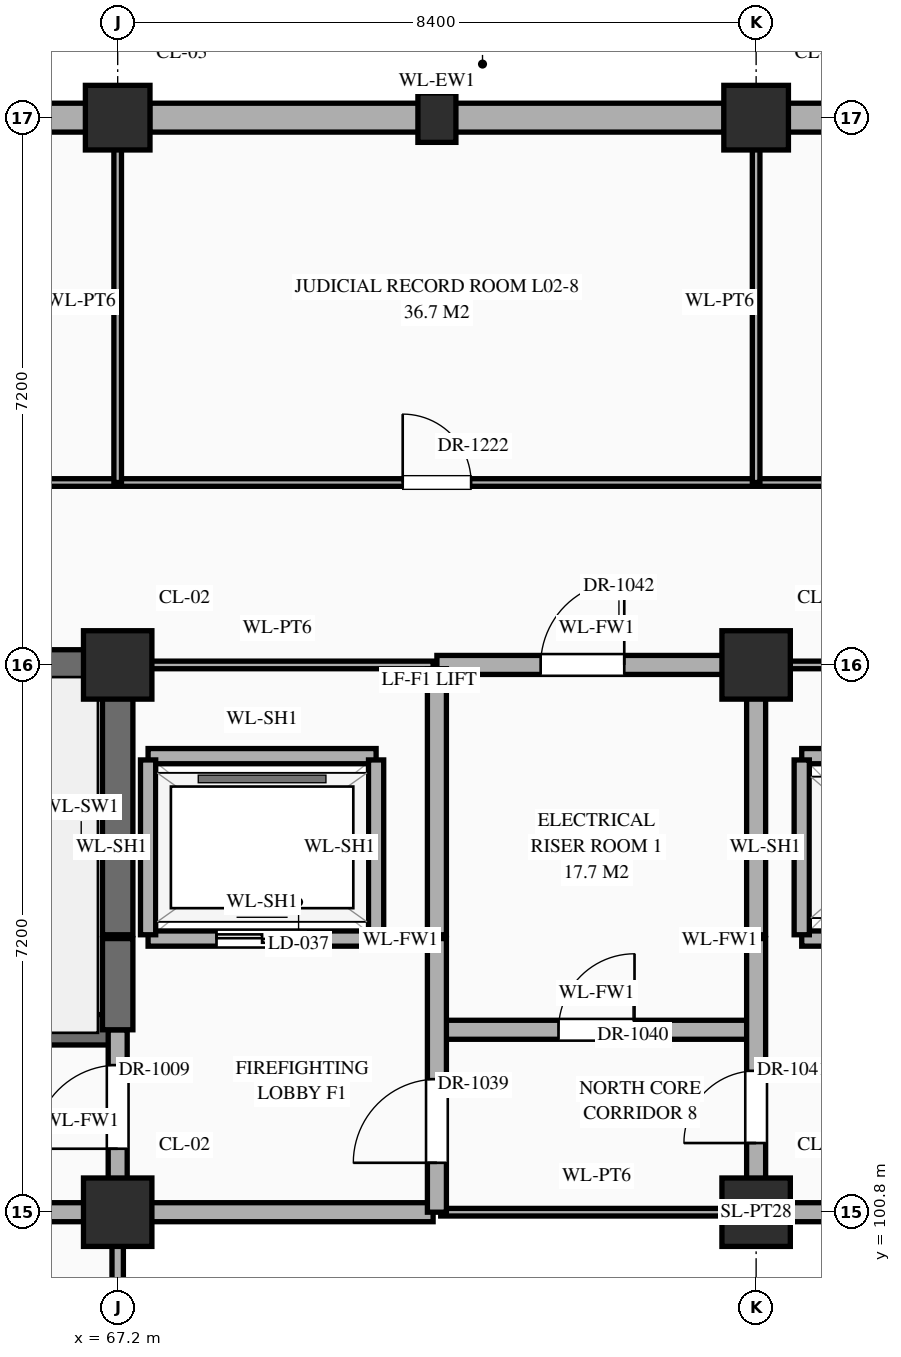
"""IFC4 building model, lengths in metres.
Left out: names, types, materials, properties, quantities, classifications, styles, units other than length and angle.
Written with IfcOpenShell. Run it as: python <this file> out.ifc"""

import sys

from ifc_helpers import new_model, si_unit, direction, frame, frame_2d, origin, origin_2d, place, context, subcontext, project, spatial, rectangle, extrude, element, fill, save


model = new_model("IFC4")
c1 = context("Model", 3, precision=1e-05, world=origin(), true_north=direction((0.0, 1.0)))
c2 = subcontext(c1, "Body", "Model", "MODEL_VIEW")
j1 = project(units=[si_unit("LENGTHUNIT", "METRE"), si_unit("PLANEANGLEUNIT", "RADIAN")], contexts=[c1])
p1 = place(None, origin())
s1 = spatial("IfcSite", under=j1, at=p1, CompositionType="ELEMENT")
p2 = place(p1, origin())
s2 = spatial("IfcBuilding", under=s1, at=p2, CompositionType="ELEMENT")
p3 = place(p2, frame((0.0, 0.0, 5.4)))
s3 = spatial("IfcBuildingStorey", under=s2, at=p3, CompositionType="ELEMENT", Elevation=5.4)
for number, where, z_axis, x_axis in (
    (1, (67.2, 100.8, 0.0), (0.0, 0.0, 1.0), (1.0, 0.0, 0.0)),
    (2, (67.2, 108.0, 0.0), (0.0, 0.0, 1.0), (1.0, 0.0, 0.0)),
):
    element("IfcColumn", number, at=place(p3, frame(where, z_axis=z_axis, x_axis=x_axis)), inside=s3, PredefinedType="COLUMN", context=c2, shape_type="SweptSolid", body=[
        extrude(rectangle(XDim=0.9, YDim=0.9, at=origin_2d()), origin(), (0.0, 0.0, 1.0), 5.4),
    ])
p4 = place(p3, frame((67.2, 115.2, 0.0), z_axis=(0.0, 0.0, 1.0), x_axis=(1.0, 0.0, 0.0)))
e3 = element("IfcColumn", 3, at=p4, inside=s3, PredefinedType="COLUMN", context=c2, shape_type="SweptSolid", body=[
    extrude(rectangle(XDim=0.85, YDim=0.85, at=origin_2d()), origin(), (0.0, 0.0, 1.0), 5.4),
])
for number, where, z_axis, x_axis in (
    (4, (75.6, 100.8, 0.0), (0.0, 0.0, 1.0), (1.0, 0.0, 0.0)),
    (5, (75.6, 108.0, 0.0), (0.0, 0.0, 1.0), (1.0, 0.0, 0.0)),
):
    element("IfcColumn", number, at=place(p3, frame(where, z_axis=z_axis, x_axis=x_axis)), inside=s3, PredefinedType="COLUMN", context=c2, shape_type="SweptSolid", body=[
        extrude(rectangle(XDim=0.9, YDim=0.9, at=origin_2d()), origin(), (0.0, 0.0, 1.0), 5.4),
    ])
p5 = place(p3, frame((75.6, 115.2, 0.0), z_axis=(0.0, 0.0, 1.0), x_axis=(1.0, 0.0, 0.0)))
e6 = element("IfcColumn", 6, at=p5, inside=s3, PredefinedType="COLUMN", context=c2, shape_type="SweptSolid", body=[
    extrude(rectangle(XDim=0.85, YDim=0.85, at=origin_2d()), origin(), (0.0, 0.0, 1.0), 5.4),
])
p6 = place(p3, frame((71.4, 115.2, 0.0), z_axis=(0.0, 0.0, 1.0), x_axis=(1.0, 0.0, 0.0)))
e7 = element("IfcColumn", 7, at=p6, inside=s3, PredefinedType="PILASTER", context=c2, shape_type="SweptSolid", body=[
    extrude(rectangle(XDim=0.5, YDim=0.65, at=origin_2d()), origin(), (0.0, 0.0, 1.0), 5.4),
])
p7 = place(p3, frame((59.22, 115.2, 0.0), z_axis=(0.0, 0.0, 1.0), x_axis=(1.0, 0.0, 0.0)))
e8 = element("IfcWall", 8, at=p7, inside=s3, PredefinedType="STANDARD", context=c2, shape_type="SweptSolid", body=[
    extrude(rectangle(XDim=7.56, YDim=0.38, at=frame_2d((3.78, 0.0))), origin(), (0.0, 0.0, 1.0), 4.47),
])
p8 = place(p3, frame((67.62, 115.2, 0.0), z_axis=(0.0, 0.0, 1.0), x_axis=(1.0, 0.0, 0.0)))
e9 = element("IfcWall", 9, at=p8, inside=s3, PredefinedType="STANDARD", context=c2, shape_type="SweptSolid", body=[
    extrude(rectangle(XDim=7.56, YDim=0.38, at=frame_2d((3.78, 0.0))), origin(), (0.0, 0.0, 1.0), 4.47),
])
p9 = place(p3, frame((76.02, 115.2, 0.0), z_axis=(0.0, 0.0, 1.0), x_axis=(1.0, 0.0, 0.0)))
e10 = element("IfcWall", 10, at=p9, inside=s3, PredefinedType="STANDARD", context=c2, shape_type="SweptSolid", body=[
    extrude(rectangle(XDim=7.56, YDim=0.38, at=frame_2d((3.78, 0.0))), origin(), (0.0, 0.0, 1.0), 4.47),
])
p10 = place(p3, frame((58.8, 100.8, 0.0), z_axis=(0.0, 0.0, 1.0), x_axis=(1.0, 0.0, 0.0)))
e11 = element("IfcWall", 11, at=p10, inside=s3, PredefinedType="STANDARD", context=c2, shape_type="SweptSolid", body=[
    extrude(rectangle(XDim=8.4, YDim=0.25, at=frame_2d((4.2, 0.0))), origin(), (0.0, 0.0, 1.0), 4.27),
])
p11 = place(p10, frame((3.725, 0.0, 0.0)))
e12 = element("IfcOpeningElement", 12, at=p11, cuts=e11, PredefinedType="OPENING", context=c2, shape_type="SweptSolid", body=[
    extrude(rectangle(XDim=0.95, YDim=2.15, at=frame_2d((0.475, 1.075))), frame((0.0, 0.137, 0.0), z_axis=(0.0, -1.0, 0.0), x_axis=(1.0, 0.0, 0.0)), (0.0, 0.0, 1.0), 0.274),
])
p12 = place(p3, frame((67.25, 100.8, 0.0), z_axis=(0.0, 0.0, 1.0), x_axis=(1.0, 0.0, 0.0)))
e13 = element("IfcWall", 13, at=p12, inside=s3, PredefinedType="STANDARD", context=c2, shape_type="SweptSolid", body=[
    extrude(rectangle(XDim=4.1, YDim=0.25, at=frame_2d((2.05, 0.0))), origin(), (0.0, 0.0, 1.0), 4.27),
])
p13 = place(p3, frame((71.45, 100.8, 0.0), z_axis=(0.0, 0.0, 1.0), x_axis=(1.0, 0.0, 0.0)))
e14 = element("IfcWall", 14, at=p13, inside=s3, PredefinedType="STANDARD", context=c2, shape_type="SweptSolid", body=[
    extrude(rectangle(XDim=4.1, YDim=0.1, at=frame_2d((2.05, 0.0))), origin(), (0.0, 0.0, 1.0), 4.27),
])
p14 = place(p3, frame((75.65, 100.8, 0.0), z_axis=(0.0, 0.0, 1.0), x_axis=(1.0, 0.0, 0.0)))
e15 = element("IfcWall", 15, at=p14, inside=s3, PredefinedType="STANDARD", context=c2, shape_type="SweptSolid", body=[
    extrude(rectangle(XDim=8.3, YDim=0.25, at=frame_2d((4.15, 0.0))), origin(), (0.0, 0.0, 1.0), 4.27),
])
p15 = place(p3, frame((58.8, 103.2, 0.0), z_axis=(0.0, 0.0, 1.0), x_axis=(1.0, 0.0, 0.0)))
e16 = element("IfcWall", 16, at=p15, inside=s3, PredefinedType="SHEAR", context=c2, shape_type="SweptSolid", body=[
    extrude(rectangle(XDim=8.4, YDim=0.4, at=frame_2d((4.2, 0.0))), origin(), (0.0, 0.0, 1.0), 5.12),
])
p16 = place(p15, frame((0.65, 0.0, 0.0)))
e17 = element("IfcOpeningElement", 17, at=p16, cuts=e16, PredefinedType="OPENING", context=c2, shape_type="SweptSolid", body=[
    extrude(rectangle(XDim=1.1, YDim=2.2, at=frame_2d((0.55, 1.1))), frame((0.0, 0.212, 0.0), z_axis=(0.0, -1.0, 0.0), x_axis=(1.0, 0.0, 0.0)), (0.0, 0.0, 1.0), 0.424),
])
p17 = place(p3, frame((71.4, 103.2, 0.0), z_axis=(0.0, 0.0, 1.0), x_axis=(1.0, 0.0, 0.0)))
e18 = element("IfcWall", 18, at=p17, inside=s3, PredefinedType="STANDARD", context=c2, shape_type="SweptSolid", body=[
    extrude(rectangle(XDim=4.2, YDim=0.25, at=frame_2d((2.1, 0.0))), origin(), (0.0, 0.0, 1.0), 5.12),
])
p18 = place(p17, frame((1.6, 0.0, 0.0)))
e19 = element("IfcOpeningElement", 19, at=p18, cuts=e18, PredefinedType="OPENING", context=c2, shape_type="SweptSolid", body=[
    extrude(rectangle(XDim=1.0, YDim=2.2, at=frame_2d((0.5, 1.1))), frame((0.0, 0.137, 0.0), z_axis=(0.0, -1.0, 0.0), x_axis=(1.0, 0.0, 0.0)), (0.0, 0.0, 1.0), 0.274),
])
p19 = place(p3, frame((67.6, 104.4, 0.0), z_axis=(0.0, 0.0, 1.0), x_axis=(1.0, 0.0, 0.0)))
e20 = element("IfcWall", 20, at=p19, inside=s3, PredefinedType="STANDARD", context=c2, shape_type="SweptSolid", body=[
    extrude(rectangle(XDim=3.0, YDim=0.2, at=frame_2d((1.5, 0.0))), origin(), (0.0, 0.0, 1.0), 5.12),
])
p20 = place(p19, frame((0.9, 0.0, 0.0)))
e21 = element("IfcOpeningElement", 21, at=p20, cuts=e20, PredefinedType="OPENING", context=c2, shape_type="SweptSolid", body=[
    extrude(rectangle(XDim=1.2, YDim=2.15, at=frame_2d((0.6, 1.075))), frame((0.0, 0.112, 0.0), z_axis=(0.0, -1.0, 0.0), x_axis=(1.0, 0.0, 0.0)), (0.0, 0.0, 1.0), 0.224),
])
p21 = place(p3, frame((76.2, 104.4, 0.0), z_axis=(0.0, 0.0, 1.0), x_axis=(1.0, 0.0, 0.0)))
e22 = element("IfcWall", 22, at=p21, inside=s3, PredefinedType="STANDARD", context=c2, shape_type="SweptSolid", body=[
    extrude(rectangle(XDim=2.4, YDim=0.2, at=frame_2d((1.2, 0.0))), origin(), (0.0, 0.0, 1.0), 5.12),
])
p22 = place(p21, frame((0.7, 0.0, 0.0)))
e23 = element("IfcOpeningElement", 23, at=p22, cuts=e22, PredefinedType="OPENING", context=c2, shape_type="SweptSolid", body=[
    extrude(rectangle(XDim=1.0, YDim=2.15, at=frame_2d((0.5, 1.075))), frame((0.0, 0.112, 0.0), z_axis=(0.0, -1.0, 0.0), x_axis=(1.0, 0.0, 0.0)), (0.0, 0.0, 1.0), 0.224),
])
p23 = place(p3, frame((67.6, 106.8, 0.0), z_axis=(0.0, 0.0, 1.0), x_axis=(1.0, 0.0, 0.0)))
e24 = element("IfcWall", 24, at=p23, inside=s3, PredefinedType="STANDARD", context=c2, shape_type="SweptSolid", body=[
    extrude(rectangle(XDim=3.0, YDim=0.2, at=frame_2d((1.5, 0.0))), origin(), (0.0, 0.0, 1.0), 5.12),
])
p24 = place(p3, frame((76.2, 106.8, 0.0), z_axis=(0.0, 0.0, 1.0), x_axis=(1.0, 0.0, 0.0)))
e25 = element("IfcWall", 25, at=p24, inside=s3, PredefinedType="STANDARD", context=c2, shape_type="SweptSolid", body=[
    extrude(rectangle(XDim=2.4, YDim=0.2, at=frame_2d((1.2, 0.0))), origin(), (0.0, 0.0, 1.0), 5.12),
])
p25 = place(p3, frame((58.8, 108.0, 0.0), z_axis=(0.0, 0.0, 1.0), x_axis=(1.0, 0.0, 0.0)))
e26 = element("IfcWall", 26, at=p25, inside=s3, PredefinedType="SHEAR", context=c2, shape_type="SweptSolid", body=[
    extrude(rectangle(XDim=8.4, YDim=0.4, at=frame_2d((4.2, 0.0))), origin(), (0.0, 0.0, 1.0), 5.12),
])
p26 = place(p3, frame((67.25, 108.0, 0.0), z_axis=(0.0, 0.0, 1.0), x_axis=(1.0, 0.0, 0.0)))
e27 = element("IfcWall", 27, at=p26, inside=s3, PredefinedType="STANDARD", context=c2, shape_type="SweptSolid", body=[
    extrude(rectangle(XDim=4.1, YDim=0.1, at=frame_2d((2.05, 0.0))), origin(), (0.0, 0.0, 1.0), 4.27),
])
p27 = place(p3, frame((71.4, 108.0, 0.0), z_axis=(0.0, 0.0, 1.0), x_axis=(1.0, 0.0, 0.0)))
e28 = element("IfcWall", 28, at=p27, inside=s3, PredefinedType="STANDARD", context=c2, shape_type="SweptSolid", body=[
    extrude(rectangle(XDim=4.2, YDim=0.25, at=frame_2d((2.1, 0.0))), origin(), (0.0, 0.0, 1.0), 4.27),
])
p28 = place(p27, frame((1.365, 0.0, 0.0)))
e29 = element("IfcOpeningElement", 29, at=p28, cuts=e28, PredefinedType="OPENING", context=c2, shape_type="SweptSolid", body=[
    extrude(rectangle(XDim=1.1, YDim=2.2, at=frame_2d((0.55, 1.1))), frame((0.0, 0.137, 0.0), z_axis=(0.0, -1.0, 0.0), x_axis=(1.0, 0.0, 0.0)), (0.0, 0.0, 1.0), 0.274),
])
p29 = place(p3, frame((75.65, 108.0, 0.0), z_axis=(0.0, 0.0, 1.0), x_axis=(1.0, 0.0, 0.0)))
e30 = element("IfcWall", 30, at=p29, inside=s3, PredefinedType="STANDARD", context=c2, shape_type="SweptSolid", body=[
    extrude(rectangle(XDim=6.15, YDim=0.1, at=frame_2d((3.075, 0.0))), origin(), (0.0, 0.0, 1.0), 4.27),
])
p30 = place(p3, frame((50.44, 110.4, 0.0), z_axis=(0.0, 0.0, 1.0), x_axis=(1.0, 0.0, 0.0)))
e31 = element("IfcWall", 31, at=p30, inside=s3, PredefinedType="STANDARD", context=c2, shape_type="SweptSolid", body=[
    extrude(rectangle(XDim=67.12, YDim=0.1, at=frame_2d((33.56, 0.0))), origin(), (0.0, 0.0, 1.0), 5.12),
])
p31 = place(p30, frame((3.65, 0.0, 0.0)))
e32 = element("IfcOpeningElement", 32, at=p31, cuts=e31, PredefinedType="OPENING", context=c2, shape_type="SweptSolid", body=[
    extrude(rectangle(XDim=1.06, YDim=2.4, at=frame_2d((0.53, 1.2))), frame((0.0, 0.062, 0.0), z_axis=(0.0, -1.0, 0.0), x_axis=(1.0, 0.0, 0.0)), (0.0, 0.0, 1.0), 0.124),
])
p32 = place(p30, frame((11.99, 0.0, 0.0)))
e33 = element("IfcOpeningElement", 33, at=p32, cuts=e31, PredefinedType="OPENING", context=c2, shape_type="SweptSolid", body=[
    extrude(rectangle(XDim=1.14, YDim=2.4, at=frame_2d((0.57, 1.2))), frame((0.0, 0.062, 0.0), z_axis=(0.0, -1.0, 0.0), x_axis=(1.0, 0.0, 0.0)), (0.0, 0.0, 1.0), 0.124),
])
p33 = place(p30, frame((20.51, 0.0, 0.0)))
e34 = element("IfcOpeningElement", 34, at=p33, cuts=e31, PredefinedType="OPENING", context=c2, shape_type="SweptSolid", body=[
    extrude(rectangle(XDim=0.9, YDim=2.15, at=frame_2d((0.45, 1.075))), frame((0.0, 0.062, 0.0), z_axis=(0.0, -1.0, 0.0), x_axis=(1.0, 0.0, 0.0)), (0.0, 0.0, 1.0), 0.124),
])
p34 = place(p30, frame((28.93, 0.0, 0.0)))
e35 = element("IfcOpeningElement", 35, at=p34, cuts=e31, PredefinedType="OPENING", context=c2, shape_type="SweptSolid", body=[
    extrude(rectangle(XDim=0.86, YDim=2.1, at=frame_2d((0.43, 1.05))), frame((0.0, 0.062, 0.0), z_axis=(0.0, -1.0, 0.0), x_axis=(1.0, 0.0, 0.0)), (0.0, 0.0, 1.0), 0.124),
])
p35 = place(p30, frame((37.3, 0.0, 0.0)))
e36 = element("IfcOpeningElement", 36, at=p35, cuts=e31, PredefinedType="OPENING", context=c2, shape_type="SweptSolid", body=[
    extrude(rectangle(XDim=0.92, YDim=2.15, at=frame_2d((0.46, 1.075))), frame((0.0, 0.062, 0.0), z_axis=(0.0, -1.0, 0.0), x_axis=(1.0, 0.0, 0.0)), (0.0, 0.0, 1.0), 0.124),
])
p36 = place(p30, frame((45.68, 0.0, 0.0)))
e37 = element("IfcOpeningElement", 37, at=p36, cuts=e31, PredefinedType="OPENING", context=c2, shape_type="SweptSolid", body=[
    extrude(rectangle(XDim=0.96, YDim=2.2, at=frame_2d((0.48, 1.1))), frame((0.0, 0.062, 0.0), z_axis=(0.0, -1.0, 0.0), x_axis=(1.0, 0.0, 0.0)), (0.0, 0.0, 1.0), 0.124),
])
p37 = place(p30, frame((54.06, 0.0, 0.0)))
e38 = element("IfcOpeningElement", 38, at=p37, cuts=e31, PredefinedType="OPENING", context=c2, shape_type="SweptSolid", body=[
    extrude(rectangle(XDim=1.0, YDim=2.25, at=frame_2d((0.5, 1.125))), frame((0.0, 0.062, 0.0), z_axis=(0.0, -1.0, 0.0), x_axis=(1.0, 0.0, 0.0)), (0.0, 0.0, 1.0), 0.124),
])
p38 = place(p30, frame((62.42, 0.0, 0.0)))
e39 = element("IfcOpeningElement", 39, at=p38, cuts=e31, PredefinedType="OPENING", context=c2, shape_type="SweptSolid", body=[
    extrude(rectangle(XDim=1.04, YDim=2.2, at=frame_2d((0.52, 1.1))), frame((0.0, 0.062, 0.0), z_axis=(0.0, -1.0, 0.0), x_axis=(1.0, 0.0, 0.0)), (0.0, 0.0, 1.0), 0.124),
])
p39 = place(p3, frame((67.2, 96.05, 0.0), z_axis=(0.0, 0.0, 1.0), x_axis=(0.0, 1.0, 0.0)))
e40 = element("IfcWall", 40, at=p39, inside=s3, PredefinedType="STANDARD", context=c2, shape_type="SweptSolid", body=[
    extrude(rectangle(XDim=4.7, YDim=0.15, at=frame_2d((2.35, 0.0))), origin(), (0.0, 0.0, 1.0), 4.37),
])
p40 = place(p3, frame((67.2, 100.8, 0.0), z_axis=(0.0, 0.0, 1.0), x_axis=(0.0, 1.0, 0.0)))
e41 = element("IfcWall", 41, at=p40, inside=s3, PredefinedType="STANDARD", context=c2, shape_type="SweptSolid", body=[
    extrude(rectangle(XDim=2.4, YDim=0.25, at=frame_2d((1.2, 0.0))), origin(), (0.0, 0.0, 1.0), 4.37),
])
p41 = place(p40, frame((0.835, 0.0, 0.0)))
e42 = element("IfcOpeningElement", 42, at=p41, cuts=e41, PredefinedType="OPENING", context=c2, shape_type="SweptSolid", body=[
    extrude(rectangle(XDim=1.1, YDim=2.2, at=frame_2d((0.55, 1.1))), frame((0.0, 0.137, 0.0), z_axis=(0.0, -1.0, 0.0), x_axis=(1.0, 0.0, 0.0)), (0.0, 0.0, 1.0), 0.274),
])
p42 = place(p3, frame((67.2, 103.2, 0.0), z_axis=(0.0, 0.0, 1.0), x_axis=(0.0, 1.0, 0.0)))
e43 = element("IfcWall", 43, at=p42, inside=s3, PredefinedType="SHEAR", context=c2, shape_type="SweptSolid", body=[
    extrude(rectangle(XDim=1.2, YDim=0.4, at=frame_2d((0.6, 0.0))), origin(), (0.0, 0.0, 1.0), 5.12),
])
p43 = place(p3, frame((67.2, 104.45, 0.0), z_axis=(0.0, 0.0, 1.0), x_axis=(0.0, 1.0, 0.0)))
e44 = element("IfcWall", 44, at=p43, inside=s3, PredefinedType="SHEAR", context=c2, shape_type="SweptSolid", body=[
    extrude(rectangle(XDim=3.5, YDim=0.4, at=frame_2d((1.75, 0.0))), origin(), (0.0, 0.0, 1.0), 5.12),
])
p44 = place(p3, frame((67.2, 110.4, 0.0), z_axis=(0.0, 0.0, 1.0), x_axis=(0.0, 1.0, 0.0)))
e45 = element("IfcWall", 45, at=p44, inside=s3, PredefinedType="STANDARD", context=c2, shape_type="SweptSolid", body=[
    extrude(rectangle(XDim=4.76, YDim=0.1, at=frame_2d((2.38, 0.0))), origin(), (0.0, 0.0, 1.0), 4.37),
])
for number, where, z_axis, x_axis in (
    (46, (67.6, 104.45, 0.0), (0.0, 0.0, 1.0), (0.0, 1.0, 0.0)),
    (47, (70.6, 104.45, 0.0), (0.0, 0.0, 1.0), (0.0, 1.0, 0.0)),
):
    element("IfcWall", number, at=place(p3, frame(where, z_axis=z_axis, x_axis=x_axis)), inside=s3, PredefinedType="STANDARD", context=c2, shape_type="SweptSolid", body=[
        extrude(rectangle(XDim=2.3, YDim=0.2, at=frame_2d((1.15, 0.0))), origin(), (0.0, 0.0, 1.0), 5.12),
    ])
p45 = place(p3, frame((71.4, 100.8, 0.0), z_axis=(0.0, 0.0, 1.0), x_axis=(0.0, 1.0, 0.0)))
e48 = element("IfcWall", 48, at=p45, inside=s3, PredefinedType="STANDARD", context=c2, shape_type="SweptSolid", body=[
    extrude(rectangle(XDim=3.6, YDim=0.25, at=frame_2d((1.8, 0.0))), origin(), (0.0, 0.0, 1.0), 4.72),
])
p46 = place(p45, frame((0.65, 0.0, 0.0)))
e49 = element("IfcOpeningElement", 49, at=p46, cuts=e48, PredefinedType="OPENING", context=c2, shape_type="SweptSolid", body=[
    extrude(rectangle(XDim=1.1, YDim=2.2, at=frame_2d((0.55, 1.1))), frame((0.0, 0.137, 0.0), z_axis=(0.0, -1.0, 0.0), x_axis=(1.0, 0.0, 0.0)), (0.0, 0.0, 1.0), 0.274),
])
p47 = place(p3, frame((71.4, 104.45, 0.0), z_axis=(0.0, 0.0, 1.0), x_axis=(0.0, 1.0, 0.0)))
e50 = element("IfcWall", 50, at=p47, inside=s3, PredefinedType="STANDARD", context=c2, shape_type="SweptSolid", body=[
    extrude(rectangle(XDim=3.5, YDim=0.25, at=frame_2d((1.75, 0.0))), origin(), (0.0, 0.0, 1.0), 4.72),
])
p48 = place(p3, frame((75.6, 100.8, 0.0), z_axis=(0.0, 0.0, 1.0), x_axis=(0.0, 1.0, 0.0)))
e51 = element("IfcWall", 51, at=p48, inside=s3, PredefinedType="STANDARD", context=c2, shape_type="SweptSolid", body=[
    extrude(rectangle(XDim=3.6, YDim=0.25, at=frame_2d((1.8, 0.0))), origin(), (0.0, 0.0, 1.0), 4.37),
])
p49 = place(p48, frame((0.91, 0.0, 0.0)))
e52 = element("IfcOpeningElement", 52, at=p49, cuts=e51, PredefinedType="OPENING", context=c2, shape_type="SweptSolid", body=[
    extrude(rectangle(XDim=0.95, YDim=2.15, at=frame_2d((0.475, 1.075))), frame((0.0, 0.137, 0.0), z_axis=(0.0, -1.0, 0.0), x_axis=(1.0, 0.0, 0.0)), (0.0, 0.0, 1.0), 0.274),
])
p50 = place(p3, frame((75.6, 104.45, 0.0), z_axis=(0.0, 0.0, 1.0), x_axis=(0.0, 1.0, 0.0)))
e53 = element("IfcWall", 53, at=p50, inside=s3, PredefinedType="STANDARD", context=c2, shape_type="SweptSolid", body=[
    extrude(rectangle(XDim=3.5, YDim=0.25, at=frame_2d((1.75, 0.0))), origin(), (0.0, 0.0, 1.0), 4.37),
])
p51 = place(p3, frame((75.6, 110.4, 0.0), z_axis=(0.0, 0.0, 1.0), x_axis=(0.0, 1.0, 0.0)))
e54 = element("IfcWall", 54, at=p51, inside=s3, PredefinedType="STANDARD", context=c2, shape_type="SweptSolid", body=[
    extrude(rectangle(XDim=4.76, YDim=0.1, at=frame_2d((2.38, 0.0))), origin(), (0.0, 0.0, 1.0), 4.37),
])
p52 = place(p3, frame((76.2, 104.45, 0.0), z_axis=(0.0, 0.0, 1.0), x_axis=(0.0, 1.0, 0.0)))
e55 = element("IfcWall", 55, at=p52, inside=s3, PredefinedType="STANDARD", context=c2, shape_type="SweptSolid", body=[
    extrude(rectangle(XDim=2.3, YDim=0.2, at=frame_2d((1.15, 0.0))), origin(), (0.0, 0.0, 1.0), 5.12),
])
p53 = place(p20, origin())
e56 = element("IfcDoor", 56, at=p53, inside=s3, OperationType="DOUBLE_DOOR_SLIDING", PredefinedType="DOOR", context=c2, shape_type="SweptSolid", body=[
    extrude(rectangle(XDim=1.2, YDim=2.15, at=frame_2d((0.6, 1.075))), frame((0.0, 0.025, 0.0), z_axis=(0.0, -1.0, 0.0), x_axis=(1.0, 0.0, 0.0)), (0.0, 0.0, 1.0), 0.05),
])
fill(e21, e56)
p54 = place(p41, origin())
e57 = element("IfcDoor", 57, at=p54, inside=s3, OperationType="SINGLE_SWING_LEFT", PredefinedType="DOOR", context=c2, shape_type="SweptSolid", body=[
    extrude(rectangle(XDim=1.1, YDim=2.2, at=frame_2d((0.55, 1.1))), frame((0.0, 0.025, 0.0), z_axis=(0.0, -1.0, 0.0), x_axis=(1.0, 0.0, 0.0)), (0.0, 0.0, 1.0), 0.05),
])
fill(e42, e57)
p55 = place(p46, origin())
e58 = element("IfcDoor", 58, at=p55, inside=s3, OperationType="SINGLE_SWING_LEFT", PredefinedType="DOOR", context=c2, shape_type="SweptSolid", body=[
    extrude(rectangle(XDim=1.1, YDim=2.2, at=frame_2d((0.55, 1.1))), frame((0.0, 0.025, 0.0), z_axis=(0.0, -1.0, 0.0), x_axis=(1.0, 0.0, 0.0)), (0.0, 0.0, 1.0), 0.05),
])
fill(e49, e58)
p56 = place(p18, origin())
e59 = element("IfcDoor", 59, at=p56, inside=s3, OperationType="SINGLE_SWING_RIGHT", PredefinedType="DOOR", context=c2, shape_type="SweptSolid", body=[
    extrude(rectangle(XDim=1.0, YDim=2.2, at=frame_2d((0.5, 1.1))), frame((0.0, 0.025, 0.0), z_axis=(0.0, -1.0, 0.0), x_axis=(1.0, 0.0, 0.0)), (0.0, 0.0, 1.0), 0.05),
])
fill(e19, e59)
p57 = place(p49, origin())
e60 = element("IfcDoor", 60, at=p57, inside=s3, OperationType="SINGLE_SWING_LEFT", PredefinedType="DOOR", context=c2, shape_type="SweptSolid", body=[
    extrude(rectangle(XDim=0.95, YDim=2.15, at=frame_2d((0.475, 1.075))), frame((0.0, 0.025, 0.0), z_axis=(0.0, -1.0, 0.0), x_axis=(1.0, 0.0, 0.0)), (0.0, 0.0, 1.0), 0.05),
])
fill(e52, e60)
p58 = place(p28, origin())
e61 = element("IfcDoor", 61, at=p58, inside=s3, OperationType="SINGLE_SWING_RIGHT", PredefinedType="DOOR", context=c2, shape_type="SweptSolid", body=[
    extrude(rectangle(XDim=1.1, YDim=2.2, at=frame_2d((0.55, 1.1))), frame((0.0, 0.025, 0.0), z_axis=(0.0, -1.0, 0.0), x_axis=(1.0, 0.0, 0.0)), (0.0, 0.0, 1.0), 0.05),
])
fill(e29, e61)
p59 = place(p33, origin())
e62 = element("IfcDoor", 62, at=p59, inside=s3, OperationType="SINGLE_SWING_LEFT", PredefinedType="DOOR", context=c2, shape_type="SweptSolid", body=[
    extrude(rectangle(XDim=0.9, YDim=2.15, at=frame_2d((0.45, 1.075))), frame((0.0, 0.025, 0.0), z_axis=(0.0, -1.0, 0.0), x_axis=(1.0, 0.0, 0.0)), (0.0, 0.0, 1.0), 0.05),
])
fill(e34, e62)
save(model, sys.argv[1])
